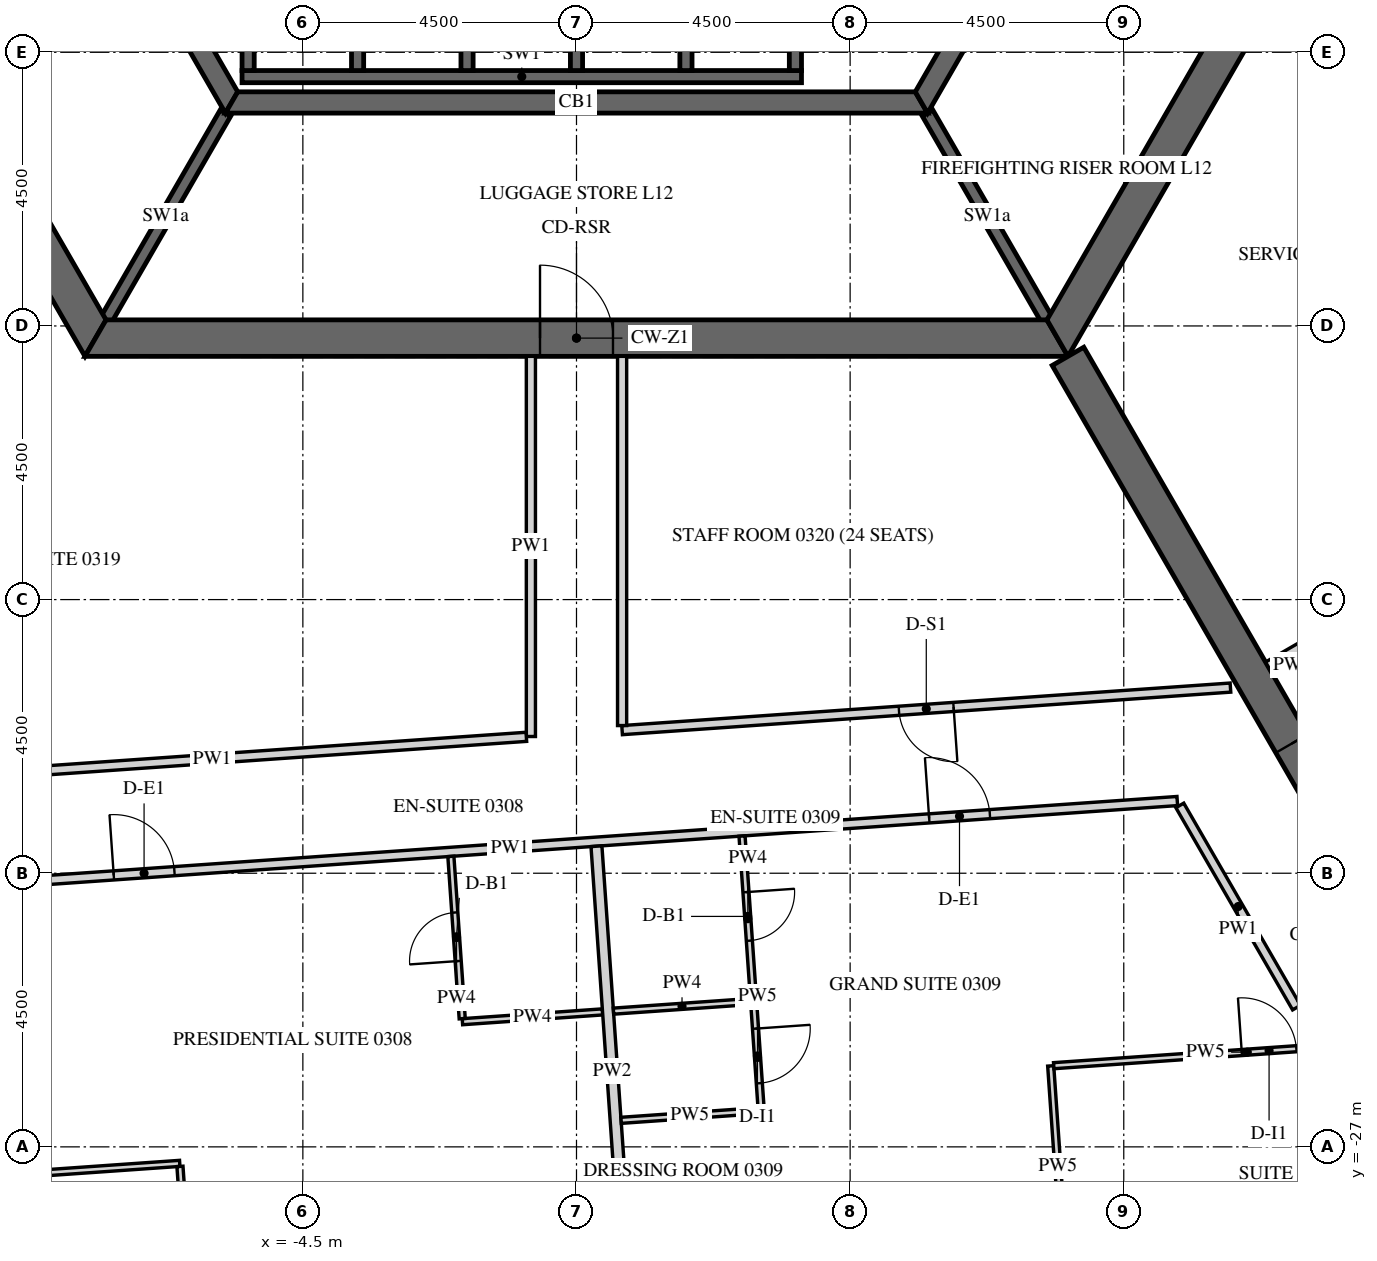
"""IFC4 building model, lengths in metres.
Left out: names, types, materials, properties, quantities, classifications, styles, units other than length and angle.
Written with IfcOpenShell. Run it as: python <this file> out.ifc"""

import sys

from ifc_helpers import new_model, si_unit, direction, frame, frame_2d, origin, place, context, subcontext, project, spatial, polyline, rectangle, outline, extrude, element, fill, save


model = new_model("IFC4")
c1 = context("Model", 3, precision=1e-05, world=origin(), true_north=direction((0.0, 1.0)))
c2 = subcontext(c1, "Body", "Model", "MODEL_VIEW")
j1 = project(units=[si_unit("LENGTHUNIT", "METRE"), si_unit("PLANEANGLEUNIT", "RADIAN")], contexts=[c1])
p1 = place(None, origin())
s1 = spatial("IfcSite", under=j1, at=p1, CompositionType="ELEMENT")
p2 = place(p1, origin())
s2 = spatial("IfcBuilding", under=s1, at=p2, CompositionType="ELEMENT")
p3 = place(p2, frame((0.0, 0.0, 60.9)))
s3 = spatial("IfcBuildingStorey", under=s2, at=p3, CompositionType="ELEMENT", Elevation=60.9)
p4 = place(p3, frame((-15.819, 0.0, -0.15), z_axis=(0.0, 0.0, 1.0), x_axis=(0.499999880136, -0.866025472988, 0.0)))
e1 = element("IfcWall", 1, at=p4, inside=s3, PredefinedType="SHEAR", context=c2, shape_type="SweptSolid", body=[
    extrude(outline(polyline([(-0.173, -0.3), (15.993, -0.3), (15.646, 0.3), (0.173, 0.3), (-0.173, -0.3)])), origin(), (0.0, 0.0, 1.0), 3.9),
])
p5 = place(p4, frame((6.981, 0.0, 0.15)))
e2 = element("IfcOpeningElement", 2, at=p5, cuts=e1, PredefinedType="OPENING", context=c2, shape_type="SweptSolid", body=[
    extrude(rectangle(XDim=1.8, YDim=2.4, at=frame_2d((0.9, 1.2))), frame((0.0, 0.31, 0.0), z_axis=(0.0, -1.0, 0.0), x_axis=(1.0, 0.0, 0.0)), (0.0, 0.0, 1.0), 0.62),
])
p6 = place(p3, frame((-7.91, -13.7, -0.15), z_axis=(0.0, 0.0, 1.0), x_axis=(1.0, 0.0, 0.0)))
e3 = element("IfcWall", 3, at=p6, inside=s3, PredefinedType="SHEAR", context=c2, shape_type="SweptSolid", body=[
    extrude(outline(polyline([(-0.173, -0.3), (15.993, -0.3), (15.646, 0.3), (0.173, 0.3), (-0.173, -0.3)])), origin(), (0.0, 0.0, 1.0), 3.9),
])
p7 = place(p6, frame((7.31, 0.0, 0.15)))
e4 = element("IfcOpeningElement", 4, at=p7, cuts=e3, PredefinedType="OPENING", context=c2, shape_type="SweptSolid", body=[
    extrude(rectangle(XDim=1.2, YDim=2.4, at=frame_2d((0.6, 1.2))), frame((0.0, 0.31, 0.0), z_axis=(0.0, -1.0, 0.0), x_axis=(1.0, 0.0, 0.0)), (0.0, 0.0, 1.0), 0.62),
])
p8 = place(p3, frame((7.91, -13.7, -0.15), z_axis=(0.0, 0.0, 1.0), x_axis=(0.499999880136, 0.866025472988, 0.0)))
e5 = element("IfcWall", 5, at=p8, inside=s3, PredefinedType="SHEAR", context=c2, shape_type="SweptSolid", body=[
    extrude(outline(polyline([(-0.173, -0.3), (15.993, -0.3), (15.646, 0.3), (0.173, 0.3), (-0.173, -0.3)])), origin(), (0.0, 0.0, 1.0), 3.9),
])
p9 = place(p8, frame((7.039, 0.0, 0.15)))
e6 = element("IfcOpeningElement", 6, at=p9, cuts=e5, PredefinedType="OPENING", context=c2, shape_type="SweptSolid", body=[
    extrude(rectangle(XDim=1.8, YDim=2.4, at=frame_2d((0.9, 1.2))), frame((0.0, 0.31, 0.0), z_axis=(0.0, -1.0, 0.0), x_axis=(1.0, 0.0, 0.0)), (0.0, 0.0, 1.0), 0.62),
])
p10 = place(p3, frame((8.083, -14.0, -0.15), z_axis=(0.0, 0.0, 1.0), x_axis=(0.499997680643, -0.866026742862, 0.0)))
e7 = element("IfcWall", 7, at=p10, inside=s3, PredefinedType="SHEAR", context=c2, shape_type="SweptSolid", body=[
    extrude(rectangle(XDim=16.509, YDim=0.6, at=frame_2d((8.254, 0.0))), origin(), (0.0, 0.0, 1.0), 3.9),
])
p11 = place(p10, frame((7.354, 0.0, 0.15)))
e8 = element("IfcOpeningElement", 8, at=p11, cuts=e7, PredefinedType="OPENING", context=c2, shape_type="SweptSolid", body=[
    extrude(rectangle(XDim=1.8, YDim=2.4, at=frame_2d((0.9, 1.2))), frame((0.0, 0.31, 0.0), z_axis=(0.0, -1.0, 0.0), x_axis=(1.0, 0.0, 0.0)), (0.0, 0.0, 1.0), 0.62),
])
p12 = place(p3, frame((-11.345, 0.0, -0.15), z_axis=(0.0, 0.0, 1.0), x_axis=(0.499995046907, -0.866028263435, 0.0)))
e9 = element("IfcWall", 9, at=p12, inside=s3, PredefinedType="SHEAR", context=c2, shape_type="SweptSolid", body=[
    extrude(outline(polyline([(-0.101, -0.175), (11.446, -0.175), (11.244, 0.175), (0.101, 0.175), (-0.101, -0.175)])), origin(), (0.0, 0.0, 1.0), 3.9),
])
p13 = place(p12, frame((4.744, 0.0, 0.15)))
e10 = element("IfcOpeningElement", 10, at=p13, cuts=e9, PredefinedType="OPENING", context=c2, shape_type="SweptSolid", body=[
    extrude(rectangle(XDim=1.8, YDim=2.4, at=frame_2d((0.9, 1.2))), frame((0.0, 0.185, 0.0), z_axis=(0.0, -1.0, 0.0), x_axis=(1.0, 0.0, 0.0)), (0.0, 0.0, 1.0), 0.37),
])
p14 = place(p3, frame((-5.673, -9.825, -0.15), z_axis=(0.0, 0.0, 1.0), x_axis=(1.0, 0.0, 0.0)))
e11 = element("IfcWall", 11, at=p14, inside=s3, PredefinedType="SHEAR", context=c2, shape_type="SweptSolid", body=[
    extrude(outline(polyline([(-0.101, -0.175), (11.446, -0.175), (11.244, 0.175), (0.101, 0.175), (-0.101, -0.175)])), origin(), (0.0, 0.0, 1.0), 3.9),
])
p15 = place(p3, frame((5.673, -9.825, -0.15), z_axis=(0.0, 0.0, 1.0), x_axis=(0.499995046907, 0.866028263435, 0.0)))
e12 = element("IfcWall", 12, at=p15, inside=s3, PredefinedType="SHEAR", context=c2, shape_type="SweptSolid", body=[
    extrude(outline(polyline([(-0.101, -0.175), (11.446, -0.175), (11.244, 0.175), (0.101, 0.175), (-0.101, -0.175)])), origin(), (0.0, 0.0, 1.0), 3.9),
])
p16 = place(p15, frame((4.801, 0.0, 0.15)))
e13 = element("IfcOpeningElement", 13, at=p16, cuts=e12, PredefinedType="OPENING", context=c2, shape_type="SweptSolid", body=[
    extrude(rectangle(XDim=1.8, YDim=2.4, at=frame_2d((0.9, 1.2))), frame((0.0, 0.185, 0.0), z_axis=(0.0, -1.0, 0.0), x_axis=(1.0, 0.0, 0.0)), (0.0, 0.0, 1.0), 0.37),
])
p17 = place(p3, frame((-5.5, -9.4, -0.25), z_axis=(0.0, 0.0, 1.0), x_axis=(1.0, 0.0, 0.0)))
e14 = element("IfcWall", 14, at=p17, inside=s3, PredefinedType="SHEAR", context=c2, shape_type="SweptSolid", body=[
    extrude(rectangle(XDim=9.2, YDim=0.2, at=frame_2d((4.6, 0.0))), origin(), (0.0, 0.0, 1.0), 3.9),
])
for number, where, z_axis, x_axis in (
    (15, (-5.4, -9.3, -0.25), (0.0, 0.0, 1.0), (0.0, 1.0, 0.0)),
    (16, (-3.6, -9.3, -0.25), (0.0, 0.0, 1.0), (0.0, 1.0, 0.0)),
    (17, (-1.8, -9.3, -0.25), (0.0, 0.0, 1.0), (0.0, 1.0, 0.0)),
    (18, (0.0, -9.3, -0.25), (0.0, 0.0, 1.0), (0.0, 1.0, 0.0)),
    (19, (1.8, -9.3, -0.25), (0.0, 0.0, 1.0), (0.0, 1.0, 0.0)),
    (20, (3.6, -9.3, -0.25), (0.0, 0.0, 1.0), (0.0, 1.0, 0.0)),
):
    element("IfcWall", number, at=place(p3, frame(where, z_axis=z_axis, x_axis=x_axis)), inside=s3, PredefinedType="SHEAR", context=c2, shape_type="SweptSolid", body=[
        extrude(rectangle(XDim=2.9, YDim=0.2, at=frame_2d((1.45, 0.0))), origin(), (0.0, 0.0, 1.0), 3.9),
    ])
for number, where, z_axis, x_axis in (
    (21, (-5.773, -10.0, -0.15), (0.0, 0.0, 1.0), (-0.5, -0.866, 0.0)),
    (22, (5.773, -10.0, -0.15), (0.0, 0.0, 1.0), (0.5, -0.866, 0.0)),
):
    element("IfcWall", number, at=place(p3, frame(where, z_axis=z_axis, x_axis=x_axis)), inside=s3, PredefinedType="SHEAR", context=c2, shape_type="SweptSolid", body=[
        extrude(rectangle(XDim=3.926, YDim=0.2, at=frame_2d((1.963, 0.0))), origin(), (0.0, 0.0, 1.0), 3.9),
    ])
p18 = place(p3, frame((-12.068, -22.847, 0.0), z_axis=(0.0, 0.0, 1.0), x_axis=(0.99756437486, 0.069751831595, 0.0)))
e23 = element("IfcWall", 23, at=p18, inside=s3, PredefinedType="PARTITIONING", context=c2, shape_type="SweptSolid", body=[
    extrude(rectangle(XDim=22.002, YDim=0.15, at=frame_2d((11.001, 0.0))), origin(), (0.0, 0.0, 1.0), 2.988),
])
p19 = place(p18, frame((4.469, 0.0, 0.0)))
e24 = element("IfcOpeningElement", 24, at=p19, cuts=e23, PredefinedType="OPENING", context=c2, shape_type="SweptSolid", body=[
    extrude(rectangle(XDim=1.0, YDim=2.1, at=frame_2d((0.5, 1.05))), frame((0.0, 0.085, 0.0), z_axis=(0.0, -1.0, 0.0), x_axis=(1.0, 0.0, 0.0)), (0.0, 0.0, 1.0), 0.17),
])
p20 = place(p18, frame((17.912, 0.0, 0.0)))
e25 = element("IfcOpeningElement", 25, at=p20, cuts=e23, PredefinedType="OPENING", context=c2, shape_type="SweptSolid", body=[
    extrude(rectangle(XDim=1.0, YDim=2.1, at=frame_2d((0.5, 1.05))), frame((0.0, 0.085, 0.0), z_axis=(0.0, -1.0, 0.0), x_axis=(1.0, 0.0, 0.0)), (0.0, 0.0, 1.0), 0.17),
])
p21 = place(p3, frame((9.922, -21.385, 0.0), z_axis=(0.0, 0.0, 1.0), x_axis=(0.500023335103, -0.866011930837, 0.0)))
e26 = element("IfcWall", 26, at=p21, inside=s3, PredefinedType="PARTITIONING", context=c2, shape_type="SweptSolid", body=[
    extrude(rectangle(XDim=3.84, YDim=0.15, at=frame_2d((1.92, 0.0))), origin(), (0.0, 0.0, 1.0), 2.988),
])
p22 = place(p3, frame((-0.75, -14.0, 0.0), z_axis=(0.0, 0.0, 1.0), x_axis=(0.0, -1.0, 0.0)))
e27 = element("IfcWall", 27, at=p22, inside=s3, PredefinedType="PARTITIONING", context=c2, shape_type="SweptSolid", body=[
    extrude(rectangle(XDim=6.252, YDim=0.15, at=frame_2d((3.126, 0.0))), origin(), (0.0, 0.0, 1.0), 2.988),
])
p23 = place(p3, frame((-0.825, -20.257, 0.0), z_axis=(0.0, 0.0, 1.0), x_axis=(-0.9975635143, -0.069764137903, 0.0)))
e28 = element("IfcWall", 28, at=p23, inside=s3, PredefinedType="PARTITIONING", context=c2, shape_type="SweptSolid", body=[
    extrude(rectangle(XDim=10.355, YDim=0.15, at=frame_2d((5.177, 0.0))), origin(), (0.0, 0.0, 1.0), 2.988),
])
p24 = place(p3, frame((10.754, -19.447, 0.0), z_axis=(0.0, 0.0, 1.0), x_axis=(-0.997564830966, -0.069745308232, 0.0)))
e29 = element("IfcWall", 29, at=p24, inside=s3, PredefinedType="PARTITIONING", context=c2, shape_type="SweptSolid", body=[
    extrude(rectangle(XDim=10.029, YDim=0.15, at=frame_2d((5.014, 0.0))), origin(), (0.0, 0.0, 1.0), 2.988),
])
p25 = place(p24, frame((4.564, 0.0, 0.0)))
e30 = element("IfcOpeningElement", 30, at=p25, cuts=e29, PredefinedType="OPENING", context=c2, shape_type="SweptSolid", body=[
    extrude(rectangle(XDim=0.9, YDim=2.1, at=frame_2d((0.45, 1.05))), frame((0.0, 0.085, 0.0), z_axis=(0.0, -1.0, 0.0), x_axis=(1.0, 0.0, 0.0)), (0.0, 0.0, 1.0), 0.17),
])
p26 = place(p3, frame((0.75, -20.072, 0.0), z_axis=(0.0, 0.0, 1.0), x_axis=(0.0, 1.0, 0.0)))
e31 = element("IfcWall", 31, at=p26, inside=s3, PredefinedType="PARTITIONING", context=c2, shape_type="SweptSolid", body=[
    extrude(rectangle(XDim=6.072, YDim=0.15, at=frame_2d((3.036, 0.0))), origin(), (0.0, 0.0, 1.0), 2.988),
])
p27 = place(p3, frame((11.614, -7.884, 0.0), z_axis=(0.0, 0.0, 1.0), x_axis=(0.866033542371, -0.499985903289, 0.0)))
e32 = element("IfcWall", 32, at=p27, inside=s3, PredefinedType="PARTITIONING", context=c2, shape_type="SweptSolid", body=[
    extrude(rectangle(XDim=6.15, YDim=0.15, at=frame_2d((3.075, 0.0))), origin(), (0.0, 0.0, 1.0), 2.988),
])
p28 = place(p3, frame((12.552, -18.409, 0.0), z_axis=(0.0, 0.0, 1.0), x_axis=(-0.866078408764, -0.499908181442, 0.0)))
e33 = element("IfcWall", 33, at=p28, inside=s3, PredefinedType="PARTITIONING", context=c2, shape_type="SweptSolid", body=[
    extrude(rectangle(XDim=1.365, YDim=0.15, at=frame_2d((0.683, 0.0))), origin(), (0.0, 0.0, 1.0), 2.988),
])
p29 = place(p3, frame((0.428, -24.781, 0.0), z_axis=(0.0, 0.0, 1.0), x_axis=(-0.997563824095, -0.069759707979, 0.0)))
e34 = element("IfcWall", 34, at=p29, inside=s3, PredefinedType="PARTITIONING", context=c2, shape_type="SweptSolid", body=[
    extrude(rectangle(XDim=2.31, YDim=0.1, at=frame_2d((1.155, 0.0))), origin(), (0.0, 0.0, 1.0), 2.988),
])
p30 = place(p3, frame((-1.879, -24.892, 0.0), z_axis=(0.0, 0.0, 1.0), x_axis=(-0.069722873391, 0.997566399257, 0.0)))
e35 = element("IfcWall", 35, at=p30, inside=s3, PredefinedType="PARTITIONING", context=c2, shape_type="SweptSolid", body=[
    extrude(rectangle(XDim=2.675, YDim=0.1, at=frame_2d((1.338, 0.0))), origin(), (0.0, 0.0, 1.0), 2.988),
])
p31 = place(p30, frame((0.95, 0.0, 0.0)))
e36 = element("IfcOpeningElement", 36, at=p31, cuts=e35, PredefinedType="OPENING", context=c2, shape_type="SweptSolid", body=[
    extrude(rectangle(XDim=0.8, YDim=2.1, at=frame_2d((0.4, 1.05))), frame((0.0, 0.06, 0.0), z_axis=(0.0, -1.0, 0.0), x_axis=(1.0, 0.0, 0.0)), (0.0, 0.0, 1.0), 0.12),
])
p32 = place(p3, frame((-14.703, -27.844, 0.0), z_axis=(0.0, 0.0, 1.0), x_axis=(0.997562679052, 0.069776080157, 0.0)))
e37 = element("IfcWall", 37, at=p32, inside=s3, PredefinedType="PARTITIONING", context=c2, shape_type="SweptSolid", body=[
    extrude(rectangle(XDim=8.198, YDim=0.1, at=frame_2d((4.099, 0.0))), origin(), (0.0, 0.0, 1.0), 2.988),
])
p33 = place(p32, frame((4.148, 0.0, 0.0)))
e38 = element("IfcOpeningElement", 38, at=p33, cuts=e37, PredefinedType="OPENING", context=c2, shape_type="SweptSolid", body=[
    extrude(rectangle(XDim=0.9, YDim=2.1, at=frame_2d((0.45, 1.05))), frame((0.0, 0.06, 0.0), z_axis=(0.0, -1.0, 0.0), x_axis=(1.0, 0.0, 0.0)), (0.0, 0.0, 1.0), 0.12),
])
p34 = place(p3, frame((-6.521, -27.322, 0.0), z_axis=(0.0, 0.0, 1.0), x_axis=(0.069832794838, -0.997558710435, 0.0)))
e39 = element("IfcWall", 39, at=p34, inside=s3, PredefinedType="PARTITIONING", context=c2, shape_type="SweptSolid", body=[
    extrude(rectangle(XDim=2.65, YDim=0.1, at=frame_2d((1.325, 0.0))), origin(), (0.0, 0.0, 1.0), 2.988),
])
p35 = place(p3, frame((0.846, -29.463, 0.0), z_axis=(0.0, 0.0, 1.0), x_axis=(-0.069774810252, 0.997562767877, 0.0)))
e40 = element("IfcWall", 40, at=p35, inside=s3, PredefinedType="PARTITIONING", context=c2, shape_type="SweptSolid", body=[
    extrude(rectangle(XDim=7.425, YDim=0.18, at=frame_2d((3.712, 0.0))), origin(), (0.0, 0.0, 1.0), 2.988),
])
p36 = place(p3, frame((2.722, -21.888, 0.0), z_axis=(0.0, 0.0, 1.0), x_axis=(0.069706086879, -0.997567572374, 0.0)))
e41 = element("IfcWall", 41, at=p36, inside=s3, PredefinedType="PARTITIONING", context=c2, shape_type="SweptSolid", body=[
    extrude(rectangle(XDim=2.725, YDim=0.1, at=frame_2d((1.362, 0.0))), origin(), (0.0, 0.0, 1.0), 2.988),
])
p37 = place(p36, frame((0.925, 0.0, 0.0)))
e42 = element("IfcOpeningElement", 42, at=p37, cuts=e41, PredefinedType="OPENING", context=c2, shape_type="SweptSolid", body=[
    extrude(rectangle(XDim=0.8, YDim=2.1, at=frame_2d((0.4, 1.05))), frame((0.0, 0.06, 0.0), z_axis=(0.0, -1.0, 0.0), x_axis=(1.0, 0.0, 0.0)), (0.0, 0.0, 1.0), 0.12),
])
p38 = place(p3, frame((2.916, -24.657, 0.0), z_axis=(0.0, 0.0, 1.0), x_axis=(0.069759707979, -0.997563824095, 0.0)))
e43 = element("IfcWall", 43, at=p38, inside=s3, PredefinedType="PARTITIONING", context=c2, shape_type="SweptSolid", body=[
    extrude(rectangle(XDim=1.75, YDim=0.1, at=frame_2d((0.875, 0.0))), origin(), (0.0, 0.0, 1.0), 2.988),
])
p39 = place(p38, frame((0.4, 0.0, 0.0)))
e44 = element("IfcOpeningElement", 44, at=p39, cuts=e43, PredefinedType="OPENING", context=c2, shape_type="SweptSolid", body=[
    extrude(rectangle(XDim=0.9, YDim=2.1, at=frame_2d((0.45, 1.05))), frame((0.0, 0.06, 0.0), z_axis=(0.0, -1.0, 0.0), x_axis=(1.0, 0.0, 0.0)), (0.0, 0.0, 1.0), 0.12),
])
p40 = place(p3, frame((2.988, -26.406, 0.0), z_axis=(0.0, 0.0, 1.0), x_axis=(-0.997561825928, -0.069788275888, 0.0)))
e45 = element("IfcWall", 45, at=p40, inside=s3, PredefinedType="PARTITIONING", context=c2, shape_type="SweptSolid", body=[
    extrude(rectangle(XDim=2.26, YDim=0.1, at=frame_2d((1.13, 0.0))), origin(), (0.0, 0.0, 1.0), 2.988),
])
p41 = place(p3, frame((8.029, -28.96, 0.0), z_axis=(0.0, 0.0, 1.0), x_axis=(-0.069764341483, 0.997563500063, 0.0)))
e46 = element("IfcWall", 46, at=p41, inside=s3, PredefinedType="PARTITIONING", context=c2, shape_type="SweptSolid", body=[
    extrude(rectangle(XDim=3.3, YDim=0.1, at=frame_2d((1.65, 0.0))), origin(), (0.0, 0.0, 1.0), 2.988),
])
p42 = place(p3, frame((7.848, -25.665, 0.0), z_axis=(0.0, 0.0, 1.0), x_axis=(0.997564959643, 0.069743467744, 0.0)))
e47 = element("IfcWall", 47, at=p42, inside=s3, PredefinedType="PARTITIONING", context=c2, shape_type="SweptSolid", body=[
    extrude(rectangle(XDim=6.382, YDim=0.1, at=frame_2d((3.191, 0.0))), origin(), (0.0, 0.0, 1.0), 2.988),
])
p43 = place(p42, frame((3.1, 0.0, 0.0)))
e48 = element("IfcOpeningElement", 48, at=p43, cuts=e47, PredefinedType="OPENING", context=c2, shape_type="SweptSolid", body=[
    extrude(rectangle(XDim=0.9, YDim=2.1, at=frame_2d((0.45, 1.05))), frame((0.0, 0.06, 0.0), z_axis=(0.0, -1.0, 0.0), x_axis=(1.0, 0.0, 0.0)), (0.0, 0.0, 1.0), 0.12),
])
p44 = place(p3, frame((0.608, -24.768, 0.0), z_axis=(0.0, 0.0, 1.0), x_axis=(0.997569341134, 0.069680769442, 0.0)))
e49 = element("IfcWall", 49, at=p44, inside=s3, PredefinedType="PARTITIONING", context=c2, shape_type="SweptSolid", body=[
    extrude(rectangle(XDim=2.26, YDim=0.1, at=frame_2d((1.13, 0.0))), origin(), (0.0, 0.0, 1.0), 2.988),
])
p45 = place(p7, origin())
e50 = element("IfcDoor", 50, at=p45, inside=s3, OperationType="SINGLE_SWING_LEFT", PredefinedType="DOOR", context=c2, shape_type="SweptSolid", body=[
    extrude(rectangle(XDim=1.2, YDim=2.4, at=frame_2d((0.6, 1.2))), frame((0.0, 0.025, 0.0), z_axis=(0.0, -1.0, 0.0), x_axis=(1.0, 0.0, 0.0)), (0.0, 0.0, 1.0), 0.05),
])
fill(e4, e50)
p46 = place(p11, origin())
e51 = element("IfcDoor", 51, at=p46, inside=s3, OperationType="DOUBLE_DOOR_SINGLE_SWING", PredefinedType="DOOR", context=c2, shape_type="SweptSolid", body=[
    extrude(rectangle(XDim=1.8, YDim=2.4, at=frame_2d((0.9, 1.2))), frame((0.0, 0.025, 0.0), z_axis=(0.0, -1.0, 0.0), x_axis=(1.0, 0.0, 0.0)), (0.0, 0.0, 1.0), 0.05),
])
fill(e8, e51)
p47 = place(p19, origin())
e52 = element("IfcDoor", 52, at=p47, inside=s3, OperationType="SINGLE_SWING_RIGHT", PredefinedType="DOOR", context=c2, shape_type="SweptSolid", body=[
    extrude(rectangle(XDim=1.0, YDim=2.1, at=frame_2d((0.5, 1.05))), frame((0.0, 0.025, 0.0), z_axis=(0.0, -1.0, 0.0), x_axis=(1.0, 0.0, 0.0)), (0.0, 0.0, 1.0), 0.05),
])
fill(e24, e52)
p48 = place(p31, origin())
e53 = element("IfcDoor", 53, at=p48, inside=s3, OperationType="SINGLE_SWING_RIGHT", PredefinedType="DOOR", context=c2, shape_type="SweptSolid", body=[
    extrude(rectangle(XDim=0.8, YDim=2.1, at=frame_2d((0.4, 1.05))), frame((0.0, 0.025, 0.0), z_axis=(0.0, -1.0, 0.0), x_axis=(1.0, 0.0, 0.0)), (0.0, 0.0, 1.0), 0.05),
])
fill(e36, e53)
p49 = place(p20, origin())
e54 = element("IfcDoor", 54, at=p49, inside=s3, OperationType="SINGLE_SWING_LEFT", PredefinedType="DOOR", context=c2, shape_type="SweptSolid", body=[
    extrude(rectangle(XDim=1.0, YDim=2.1, at=frame_2d((0.5, 1.05))), frame((0.0, 0.025, 0.0), z_axis=(0.0, -1.0, 0.0), x_axis=(1.0, 0.0, 0.0)), (0.0, 0.0, 1.0), 0.05),
])
fill(e25, e54)
p50 = place(p37, origin())
e55 = element("IfcDoor", 55, at=p50, inside=s3, OperationType="SINGLE_SWING_RIGHT", PredefinedType="DOOR", context=c2, shape_type="SweptSolid", body=[
    extrude(rectangle(XDim=0.8, YDim=2.1, at=frame_2d((0.4, 1.05))), frame((0.0, 0.025, 0.0), z_axis=(0.0, -1.0, 0.0), x_axis=(1.0, 0.0, 0.0)), (0.0, 0.0, 1.0), 0.05),
])
fill(e42, e55)
p51 = place(p39, origin())
e56 = element("IfcDoor", 56, at=p51, inside=s3, OperationType="SINGLE_SWING_RIGHT", PredefinedType="DOOR", context=c2, shape_type="SweptSolid", body=[
    extrude(rectangle(XDim=0.9, YDim=2.1, at=frame_2d((0.45, 1.05))), frame((0.0, 0.025, 0.0), z_axis=(0.0, -1.0, 0.0), x_axis=(1.0, 0.0, 0.0)), (0.0, 0.0, 1.0), 0.05),
])
fill(e44, e56)
p52 = place(p43, origin())
e57 = element("IfcDoor", 57, at=p52, inside=s3, OperationType="SINGLE_SWING_LEFT", PredefinedType="DOOR", context=c2, shape_type="SweptSolid", body=[
    extrude(rectangle(XDim=0.9, YDim=2.1, at=frame_2d((0.45, 1.05))), frame((0.0, 0.025, 0.0), z_axis=(0.0, -1.0, 0.0), x_axis=(1.0, 0.0, 0.0)), (0.0, 0.0, 1.0), 0.05),
])
fill(e48, e57)
p53 = place(p25, origin())
e58 = element("IfcDoor", 58, at=p53, inside=s3, OperationType="SINGLE_SWING_LEFT", PredefinedType="DOOR", context=c2, shape_type="SweptSolid", body=[
    extrude(rectangle(XDim=0.9, YDim=2.1, at=frame_2d((0.45, 1.05))), frame((0.0, 0.025, 0.0), z_axis=(0.0, -1.0, 0.0), x_axis=(1.0, 0.0, 0.0)), (0.0, 0.0, 1.0), 0.05),
])
fill(e30, e58)
save(model, sys.argv[1])
